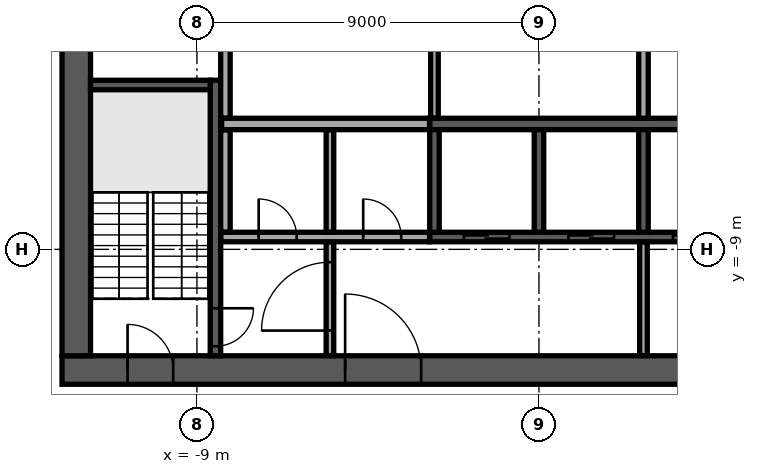
"""IFC4 building model, lengths in metres.
Left out: names, types, materials, properties, quantities, classifications, styles, units other than length and angle.
Written with IfcOpenShell. Run it as: python <this file> out.ifc"""

import sys

from ifc_helpers import new_model, si_unit, direction, frame, frame_2d, origin, place, context, subcontext, project, spatial, rectangle, extrude, element, fill, save


model = new_model("IFC4")
c1 = context("Model", 3, precision=1e-05, world=origin(), true_north=direction((0.0, 1.0)))
c2 = subcontext(c1, "Body", "Model", "MODEL_VIEW")
j1 = project(units=[si_unit("LENGTHUNIT", "METRE"), si_unit("PLANEANGLEUNIT", "RADIAN")], contexts=[c1])
p1 = place(None, origin())
s1 = spatial("IfcSite", under=j1, at=p1, CompositionType="ELEMENT")
p2 = place(p1, origin())
s2 = spatial("IfcBuilding", under=s1, at=p2, CompositionType="ELEMENT")
p3 = place(p2, frame((0.0, 0.0, 274.9)))
s3 = spatial("IfcBuildingStorey", under=s2, at=p3, CompositionType="ELEMENT", Elevation=274.9)
p4 = place(p3, frame((-12.55, -12.175, 0.0), z_axis=(0.0, 0.0, 1.0), x_axis=(1.0, 0.0, 0.0)))
e1 = element("IfcWall", 1, at=p4, inside=s3, PredefinedType="SHEAR", context=c2, shape_type="SweptSolid", body=[
    extrude(rectangle(XDim=25.1, YDim=0.75, at=frame_2d((12.55, 0.0))), origin(), (0.0, 0.0, 1.0), 3.64),
])
p5 = place(p4, frame((7.45, 0.0, 0.0)))
e2 = element("IfcOpeningElement", 2, at=p5, cuts=e1, PredefinedType="OPENING", context=c2, shape_type="SweptSolid", body=[
    extrude(rectangle(XDim=2.0, YDim=2.1, at=frame_2d((1.0, 1.05))), frame((0.0, 0.385, 0.0), z_axis=(0.0, -1.0, 0.0), x_axis=(1.0, 0.0, 0.0)), (0.0, 0.0, 1.0), 0.77),
])
p6 = place(p4, frame((17.575, 0.0, 0.0)))
e3 = element("IfcOpeningElement", 3, at=p6, cuts=e1, PredefinedType="OPENING", context=c2, shape_type="SweptSolid", body=[
    extrude(rectangle(XDim=1.2, YDim=2.1, at=frame_2d((0.6, 1.05))), frame((0.0, 0.385, 0.0), z_axis=(0.0, -1.0, 0.0), x_axis=(1.0, 0.0, 0.0)), (0.0, 0.0, 1.0), 0.77),
])
p7 = place(p4, frame((1.725, 0.0, 0.0)))
e4 = element("IfcOpeningElement", 4, at=p7, cuts=e1, PredefinedType="OPENING", context=c2, shape_type="SweptSolid", body=[
    extrude(rectangle(XDim=1.2, YDim=2.1, at=frame_2d((0.6, 1.05))), frame((0.0, 0.385, 0.0), z_axis=(0.0, -1.0, 0.0), x_axis=(1.0, 0.0, 0.0)), (0.0, 0.0, 1.0), 0.77),
])
p8 = place(p4, frame((22.175, 0.0, 0.0)))
e5 = element("IfcOpeningElement", 5, at=p8, cuts=e1, PredefinedType="OPENING", context=c2, shape_type="SweptSolid", body=[
    extrude(rectangle(XDim=1.2, YDim=2.1, at=frame_2d((0.6, 1.05))), frame((0.0, 0.385, 0.0), z_axis=(0.0, -1.0, 0.0), x_axis=(1.0, 0.0, 0.0)), (0.0, 0.0, 1.0), 0.77),
])
p9 = place(p3, frame((-12.175, -11.8, 0.0), z_axis=(0.0, 0.0, 1.0), x_axis=(0.0, 1.0, 0.0)))
e6 = element("IfcWall", 6, at=p9, inside=s3, PredefinedType="SHEAR", context=c2, shape_type="SweptSolid", body=[
    extrude(rectangle(XDim=23.6, YDim=0.75, at=frame_2d((11.8, 0.0))), origin(), (0.0, 0.0, 1.0), 3.64),
])
p10 = place(p9, frame((10.6, 0.0, 0.0)))
e7 = element("IfcOpeningElement", 7, at=p10, cuts=e6, PredefinedType="OPENING", context=c2, shape_type="SweptSolid", body=[
    extrude(rectangle(XDim=2.4, YDim=2.4, at=frame_2d((1.2, 1.2))), frame((0.0, 0.385, 0.0), z_axis=(0.0, -1.0, 0.0), x_axis=(1.0, 0.0, 0.0)), (0.0, 0.0, 1.0), 0.77),
])
p11 = place(p3, frame((-2.875, -5.7, 0.0), z_axis=(0.0, 0.0, 1.0), x_axis=(1.0, 0.0, 0.0)))
e8 = element("IfcWall", 8, at=p11, inside=s3, PredefinedType="SOLIDWALL", context=c2, shape_type="SweptSolid", body=[
    extrude(rectangle(XDim=11.25, YDim=0.3, at=frame_2d((5.625, 0.0))), origin(), (0.0, 0.0, 1.0), 3.64),
])
p12 = place(p3, frame((2.75, -5.55, 0.0), z_axis=(0.0, 0.0, 1.0), x_axis=(0.0, 1.0, 0.0)))
e9 = element("IfcWall", 9, at=p12, inside=s3, PredefinedType="SOLIDWALL", context=c2, shape_type="SweptSolid", body=[
    extrude(rectangle(XDim=2.7, YDim=0.25, at=frame_2d((1.35, 0.0))), origin(), (0.0, 0.0, 1.0), 3.64),
])
p13 = place(p3, frame((-2.875, -8.675, 0.0), z_axis=(0.0, 0.0, 1.0), x_axis=(1.0, 0.0, 0.0)))
e10 = element("IfcWall", 10, at=p13, inside=s3, PredefinedType="SOLIDWALL", context=c2, shape_type="SweptSolid", body=[
    extrude(rectangle(XDim=11.25, YDim=0.25, at=frame_2d((5.625, 0.0))), origin(), (0.0, 0.0, 1.0), 3.64),
])
p14 = place(p13, frame((0.9, 0.0, 0.0)))
e11 = element("IfcOpeningElement", 11, at=p14, cuts=e10, PredefinedType="OPENING", context=c2, shape_type="SweptSolid", body=[
    extrude(rectangle(XDim=1.2, YDim=2.1, at=frame_2d((0.6, 1.05))), frame((0.0, 0.135, 0.0), z_axis=(0.0, -1.0, 0.0), x_axis=(1.0, 0.0, 0.0)), (0.0, 0.0, 1.0), 0.27),
])
p15 = place(p13, frame((3.65, 0.0, 0.0)))
e12 = element("IfcOpeningElement", 12, at=p15, cuts=e10, PredefinedType="OPENING", context=c2, shape_type="SweptSolid", body=[
    extrude(rectangle(XDim=1.2, YDim=2.1, at=frame_2d((0.6, 1.05))), frame((0.0, 0.135, 0.0), z_axis=(0.0, -1.0, 0.0), x_axis=(1.0, 0.0, 0.0)), (0.0, 0.0, 1.0), 0.27),
])
p16 = place(p13, frame((6.4, 0.0, 0.0)))
e13 = element("IfcOpeningElement", 13, at=p16, cuts=e10, PredefinedType="OPENING", context=c2, shape_type="SweptSolid", body=[
    extrude(rectangle(XDim=1.2, YDim=2.1, at=frame_2d((0.6, 1.05))), frame((0.0, 0.135, 0.0), z_axis=(0.0, -1.0, 0.0), x_axis=(1.0, 0.0, 0.0)), (0.0, 0.0, 1.0), 0.27),
])
p17 = place(p13, frame((9.15, 0.0, 0.0)))
e14 = element("IfcOpeningElement", 14, at=p17, cuts=e10, PredefinedType="OPENING", context=c2, shape_type="SweptSolid", body=[
    extrude(rectangle(XDim=1.2, YDim=2.1, at=frame_2d((0.6, 1.05))), frame((0.0, 0.135, 0.0), z_axis=(0.0, -1.0, 0.0), x_axis=(1.0, 0.0, 0.0)), (0.0, 0.0, 1.0), 0.27),
])
for number, where, z_axis, x_axis in (
    (15, (-2.75, -8.55, 0.0), (0.0, 0.0, 1.0), (0.0, 1.0, 0.0)),
    (16, (0.0, -8.55, 0.0), (0.0, 0.0, 1.0), (0.0, 1.0, 0.0)),
    (17, (2.75, -8.55, 0.0), (0.0, 0.0, 1.0), (0.0, 1.0, 0.0)),
):
    element("IfcWall", number, at=place(p3, frame(where, z_axis=z_axis, x_axis=x_axis)), inside=s3, PredefinedType="SOLIDWALL", context=c2, shape_type="SweptSolid", body=[
        extrude(rectangle(XDim=2.7, YDim=0.25, at=frame_2d((1.35, 0.0))), origin(), (0.0, 0.0, 1.0), 3.64),
    ])
p18 = place(p3, frame((-8.512, -4.55, 0.0), z_axis=(0.0, 0.0, 1.0), x_axis=(0.0, -1.0, 0.0)))
e18 = element("IfcWall", 18, at=p18, inside=s3, PredefinedType="SOLIDWALL", context=c2, shape_type="SweptSolid", body=[
    extrude(rectangle(XDim=7.25, YDim=0.275, at=frame_2d((3.625, 0.0))), origin(), (0.0, 0.0, 1.0), 3.64),
])
p19 = place(p18, frame((6.0, 0.0, 0.0)))
e19 = element("IfcOpeningElement", 19, at=p19, cuts=e18, PredefinedType="OPENING", context=c2, shape_type="SweptSolid", body=[
    extrude(rectangle(XDim=1.0, YDim=2.1, at=frame_2d((0.5, 1.05))), frame((0.0, 0.147, 0.0), z_axis=(0.0, -1.0, 0.0), x_axis=(1.0, 0.0, 0.0)), (0.0, 0.0, 1.0), 0.295),
])
p20 = place(p3, frame((-8.65, -4.675, 0.0), z_axis=(0.0, 0.0, 1.0), x_axis=(-1.0, 0.0, 0.0)))
e20 = element("IfcWall", 20, at=p20, inside=s3, PredefinedType="SOLIDWALL", context=c2, shape_type="SweptSolid", body=[
    extrude(rectangle(XDim=3.15, YDim=0.25, at=frame_2d((1.575, 0.0))), origin(), (0.0, 0.0, 1.0), 3.64),
])
p21 = place(p3, frame((-5.5, -11.795, 0.0), z_axis=(0.0, 0.0, 1.0), x_axis=(0.0, 1.0, 0.0)))
e21 = element("IfcWall", 21, at=p21, inside=s3, PredefinedType="PARTITIONING", context=c2, shape_type="SweptSolid", body=[
    extrude(rectangle(XDim=2.99, YDim=0.2, at=frame_2d((1.495, 0.0))), origin(), (0.0, 0.0, 1.0), 3.64),
])
p22 = place(p21, frame((0.657, 0.0, 0.0)))
e22 = element("IfcOpeningElement", 22, at=p22, cuts=e21, PredefinedType="OPENING", context=c2, shape_type="SweptSolid", body=[
    extrude(rectangle(XDim=1.8, YDim=2.1, at=frame_2d((0.9, 1.05))), frame((0.0, 0.11, 0.0), z_axis=(0.0, -1.0, 0.0), x_axis=(1.0, 0.0, 0.0)), (0.0, 0.0, 1.0), 0.22),
])
p23 = place(p3, frame((2.75, -11.795, 0.0), z_axis=(0.0, 0.0, 1.0), x_axis=(0.0, 1.0, 0.0)))
e23 = element("IfcWall", 23, at=p23, inside=s3, PredefinedType="PARTITIONING", context=c2, shape_type="SweptSolid", body=[
    extrude(rectangle(XDim=2.99, YDim=0.2, at=frame_2d((1.495, 0.0))), origin(), (0.0, 0.0, 1.0), 3.64),
])
p24 = place(p3, frame((-8.37, -8.675, 0.0), z_axis=(0.0, 0.0, 1.0), x_axis=(1.0, 0.0, 0.0)))
e24 = element("IfcWall", 24, at=p24, inside=s3, PredefinedType="PARTITIONING", context=c2, shape_type="SweptSolid", body=[
    extrude(rectangle(XDim=5.49, YDim=0.25, at=frame_2d((2.745, 0.0))), origin(), (0.0, 0.0, 1.0), 3.64),
])
p25 = place(p24, frame((0.995, 0.0, 0.0)))
e25 = element("IfcOpeningElement", 25, at=p25, cuts=e24, PredefinedType="OPENING", context=c2, shape_type="SweptSolid", body=[
    extrude(rectangle(XDim=1.0, YDim=2.1, at=frame_2d((0.5, 1.05))), frame((0.0, 0.135, 0.0), z_axis=(0.0, -1.0, 0.0), x_axis=(1.0, 0.0, 0.0)), (0.0, 0.0, 1.0), 0.27),
])
p26 = place(p24, frame((3.745, 0.0, 0.0)))
e26 = element("IfcOpeningElement", 26, at=p26, cuts=e24, PredefinedType="OPENING", context=c2, shape_type="SweptSolid", body=[
    extrude(rectangle(XDim=1.0, YDim=2.1, at=frame_2d((0.5, 1.05))), frame((0.0, 0.135, 0.0), z_axis=(0.0, -1.0, 0.0), x_axis=(1.0, 0.0, 0.0)), (0.0, 0.0, 1.0), 0.27),
])
p27 = place(p3, frame((-8.25, -8.545, 0.0), z_axis=(0.0, 0.0, 1.0), x_axis=(0.0, 1.0, 0.0)))
e27 = element("IfcWall", 27, at=p27, inside=s3, PredefinedType="PARTITIONING", context=c2, shape_type="SweptSolid", body=[
    extrude(rectangle(XDim=2.69, YDim=0.25, at=frame_2d((1.345, 0.0))), origin(), (0.0, 0.0, 1.0), 3.64),
])
p28 = place(p3, frame((-5.5, -8.545, 0.0), z_axis=(0.0, 0.0, 1.0), x_axis=(0.0, 1.0, 0.0)))
e28 = element("IfcWall", 28, at=p28, inside=s3, PredefinedType="PARTITIONING", context=c2, shape_type="SweptSolid", body=[
    extrude(rectangle(XDim=2.69, YDim=0.2, at=frame_2d((1.345, 0.0))), origin(), (0.0, 0.0, 1.0), 3.64),
])
p29 = place(p3, frame((-8.35, -5.7, 0.0), z_axis=(0.0, 0.0, 1.0), x_axis=(1.0, 0.0, 0.0)))
e29 = element("IfcWall", 29, at=p29, inside=s3, PredefinedType="PARTITIONING", context=c2, shape_type="SweptSolid", body=[
    extrude(rectangle(XDim=5.47, YDim=0.3, at=frame_2d((2.735, 0.0))), origin(), (0.0, 0.0, 1.0), 3.64),
])
p30 = place(p3, frame((-8.25, -5.545, 0.0), z_axis=(0.0, 0.0, 1.0), x_axis=(0.0, 1.0, 0.0)))
e30 = element("IfcWall", 30, at=p30, inside=s3, PredefinedType="PARTITIONING", context=c2, shape_type="SweptSolid", body=[
    extrude(rectangle(XDim=2.69, YDim=0.25, at=frame_2d((1.345, 0.0))), origin(), (0.0, 0.0, 1.0), 3.64),
])
p31 = place(p3, frame((-2.75, -5.545, 0.0), z_axis=(0.0, 0.0, 1.0), x_axis=(0.0, 1.0, 0.0)))
e31 = element("IfcWall", 31, at=p31, inside=s3, PredefinedType="PARTITIONING", context=c2, shape_type="SweptSolid", body=[
    extrude(rectangle(XDim=2.69, YDim=0.2, at=frame_2d((1.345, 0.0))), origin(), (0.0, 0.0, 1.0), 3.64),
])
p32 = place(p3, frame((-9.159, 32.618, 0.0), z_axis=(0.0, 0.0, 1.0), x_axis=(-0.469470468388, -0.88294817476, 0.0)))
e32 = element("IfcWall", 32, at=p32, inside=s3, PredefinedType="STANDARD", context=c2, shape_type="SweptSolid", body=[
    extrude(rectangle(XDim=48.843, YDim=0.6, at=frame_2d((24.422, 0.0))), origin(), (0.0, 0.0, 1.0), 3.64),
])
p33 = place(p32, frame((1.22, 0.0, 0.9)))
e33 = element("IfcOpeningElement", 33, at=p33, cuts=e32, PredefinedType="OPENING", context=c2, shape_type="SweptSolid", body=[
    extrude(rectangle(XDim=2.0, YDim=2.1, at=frame_2d((1.0, 1.05))), frame((0.0, 0.31, 0.0), z_axis=(0.0, -1.0, 0.0), x_axis=(1.0, 0.0, 0.0)), (0.0, 0.0, 1.0), 0.62),
])
p34 = place(p32, frame((5.66, 0.0, 0.9)))
e34 = element("IfcOpeningElement", 34, at=p34, cuts=e32, PredefinedType="OPENING", context=c2, shape_type="SweptSolid", body=[
    extrude(rectangle(XDim=2.0, YDim=2.1, at=frame_2d((1.0, 1.05))), frame((0.0, 0.31, 0.0), z_axis=(0.0, -1.0, 0.0), x_axis=(1.0, 0.0, 0.0)), (0.0, 0.0, 1.0), 0.62),
])
p35 = place(p32, frame((10.101, 0.0, 0.9)))
e35 = element("IfcOpeningElement", 35, at=p35, cuts=e32, PredefinedType="OPENING", context=c2, shape_type="SweptSolid", body=[
    extrude(rectangle(XDim=2.0, YDim=2.1, at=frame_2d((1.0, 1.05))), frame((0.0, 0.31, 0.0), z_axis=(0.0, -1.0, 0.0), x_axis=(1.0, 0.0, 0.0)), (0.0, 0.0, 1.0), 0.62),
])
p36 = place(p32, frame((14.541, 0.0, 0.9)))
e36 = element("IfcOpeningElement", 36, at=p36, cuts=e32, PredefinedType="OPENING", context=c2, shape_type="SweptSolid", body=[
    extrude(rectangle(XDim=2.0, YDim=2.1, at=frame_2d((1.0, 1.05))), frame((0.0, 0.31, 0.0), z_axis=(0.0, -1.0, 0.0), x_axis=(1.0, 0.0, 0.0)), (0.0, 0.0, 1.0), 0.62),
])
p37 = place(p32, frame((18.981, 0.0, 0.9)))
e37 = element("IfcOpeningElement", 37, at=p37, cuts=e32, PredefinedType="OPENING", context=c2, shape_type="SweptSolid", body=[
    extrude(rectangle(XDim=2.0, YDim=2.1, at=frame_2d((1.0, 1.05))), frame((0.0, 0.31, 0.0), z_axis=(0.0, -1.0, 0.0), x_axis=(1.0, 0.0, 0.0)), (0.0, 0.0, 1.0), 0.62),
])
p38 = place(p32, frame((23.422, 0.0, 0.9)))
e38 = element("IfcOpeningElement", 38, at=p38, cuts=e32, PredefinedType="OPENING", context=c2, shape_type="SweptSolid", body=[
    extrude(rectangle(XDim=2.0, YDim=2.1, at=frame_2d((1.0, 1.05))), frame((0.0, 0.31, 0.0), z_axis=(0.0, -1.0, 0.0), x_axis=(1.0, 0.0, 0.0)), (0.0, 0.0, 1.0), 0.62),
])
p39 = place(p32, frame((27.862, 0.0, 0.9)))
e39 = element("IfcOpeningElement", 39, at=p39, cuts=e32, PredefinedType="OPENING", context=c2, shape_type="SweptSolid", body=[
    extrude(rectangle(XDim=2.0, YDim=2.1, at=frame_2d((1.0, 1.05))), frame((0.0, 0.31, 0.0), z_axis=(0.0, -1.0, 0.0), x_axis=(1.0, 0.0, 0.0)), (0.0, 0.0, 1.0), 0.62),
])
p40 = place(p32, frame((32.302, 0.0, 0.9)))
e40 = element("IfcOpeningElement", 40, at=p40, cuts=e32, PredefinedType="OPENING", context=c2, shape_type="SweptSolid", body=[
    extrude(rectangle(XDim=2.0, YDim=2.1, at=frame_2d((1.0, 1.05))), frame((0.0, 0.31, 0.0), z_axis=(0.0, -1.0, 0.0), x_axis=(1.0, 0.0, 0.0)), (0.0, 0.0, 1.0), 0.62),
])
p41 = place(p32, frame((36.742, 0.0, 0.9)))
e41 = element("IfcOpeningElement", 41, at=p41, cuts=e32, PredefinedType="OPENING", context=c2, shape_type="SweptSolid", body=[
    extrude(rectangle(XDim=2.0, YDim=2.1, at=frame_2d((1.0, 1.05))), frame((0.0, 0.31, 0.0), z_axis=(0.0, -1.0, 0.0), x_axis=(1.0, 0.0, 0.0)), (0.0, 0.0, 1.0), 0.62),
])
p42 = place(p32, frame((41.183, 0.0, 0.9)))
e42 = element("IfcOpeningElement", 42, at=p42, cuts=e32, PredefinedType="OPENING", context=c2, shape_type="SweptSolid", body=[
    extrude(rectangle(XDim=2.0, YDim=2.1, at=frame_2d((1.0, 1.05))), frame((0.0, 0.31, 0.0), z_axis=(0.0, -1.0, 0.0), x_axis=(1.0, 0.0, 0.0)), (0.0, 0.0, 1.0), 0.62),
])
p43 = place(p32, frame((45.623, 0.0, 0.9)))
e43 = element("IfcOpeningElement", 43, at=p43, cuts=e32, PredefinedType="OPENING", context=c2, shape_type="SweptSolid", body=[
    extrude(rectangle(XDim=2.0, YDim=2.1, at=frame_2d((1.0, 1.05))), frame((0.0, 0.31, 0.0), z_axis=(0.0, -1.0, 0.0), x_axis=(1.0, 0.0, 0.0)), (0.0, 0.0, 1.0), 0.62),
])
p44 = place(p3, frame((-26.271, -7.606, 0.0), z_axis=(0.0, 0.0, 1.0), x_axis=(0.882946860375, -0.469472940385, 0.0)))
e44 = element("IfcWall", 44, at=p44, inside=s3, PredefinedType="PARTITIONING", context=c2, shape_type="SweptSolid", body=[
    extrude(rectangle(XDim=39.325, YDim=0.15, at=frame_2d((19.662, 0.0))), origin(), (0.0, 0.0, 1.0), 3.04),
])
p45 = place(p44, frame((2.8, 0.0, 0.0)))
e45 = element("IfcOpeningElement", 45, at=p45, cuts=e44, PredefinedType="OPENING", context=c2, shape_type="SweptSolid", body=[
    extrude(rectangle(XDim=1.0, YDim=2.1, at=frame_2d((0.5, 1.05))), frame((0.0, 0.085, 0.0), z_axis=(0.0, -1.0, 0.0), x_axis=(1.0, 0.0, 0.0)), (0.0, 0.0, 1.0), 0.17),
])
p46 = place(p44, frame((6.915, 0.0, 0.0)))
e46 = element("IfcOpeningElement", 46, at=p46, cuts=e44, PredefinedType="OPENING", context=c2, shape_type="SweptSolid", body=[
    extrude(rectangle(XDim=1.0, YDim=2.1, at=frame_2d((0.5, 1.05))), frame((0.0, 0.085, 0.0), z_axis=(0.0, -1.0, 0.0), x_axis=(1.0, 0.0, 0.0)), (0.0, 0.0, 1.0), 0.17),
])
p47 = place(p44, frame((14.499, 0.0, 0.0)))
e47 = element("IfcOpeningElement", 47, at=p47, cuts=e44, PredefinedType="OPENING", context=c2, shape_type="SweptSolid", body=[
    extrude(rectangle(XDim=1.0, YDim=2.1, at=frame_2d((0.5, 1.05))), frame((0.0, 0.085, 0.0), z_axis=(0.0, -1.0, 0.0), x_axis=(1.0, 0.0, 0.0)), (0.0, 0.0, 1.0), 0.17),
])
p48 = place(p44, frame((25.785, 0.0, 0.0)))
e48 = element("IfcOpeningElement", 48, at=p48, cuts=e44, PredefinedType="OPENING", context=c2, shape_type="SweptSolid", body=[
    extrude(rectangle(XDim=1.0, YDim=2.1, at=frame_2d((0.5, 1.05))), frame((0.0, 0.085, 0.0), z_axis=(0.0, -1.0, 0.0), x_axis=(1.0, 0.0, 0.0)), (0.0, 0.0, 1.0), 0.17),
])
p49 = place(p44, frame((37.741, 0.0, 0.0)))
e49 = element("IfcOpeningElement", 49, at=p49, cuts=e44, PredefinedType="OPENING", context=c2, shape_type="SweptSolid", body=[
    extrude(rectangle(XDim=1.0, YDim=2.1, at=frame_2d((0.5, 1.05))), frame((0.0, 0.085, 0.0), z_axis=(0.0, -1.0, 0.0), x_axis=(1.0, 0.0, 0.0)), (0.0, 0.0, 1.0), 0.17),
])
p50 = place(p5, origin())
e50 = element("IfcDoor", 50, at=p50, inside=s3, OperationType="SINGLE_SWING_LEFT", PredefinedType="DOOR", context=c2, shape_type="SweptSolid", body=[
    extrude(rectangle(XDim=2.0, YDim=2.1, at=frame_2d((1.0, 1.05))), frame((0.0, 0.025, 0.0), z_axis=(0.0, -1.0, 0.0), x_axis=(1.0, 0.0, 0.0)), (0.0, 0.0, 1.0), 0.05),
])
fill(e2, e50)
p51 = place(p7, origin())
e51 = element("IfcDoor", 51, at=p51, inside=s3, OperationType="SINGLE_SWING_LEFT", PredefinedType="DOOR", context=c2, shape_type="SweptSolid", body=[
    extrude(rectangle(XDim=1.2, YDim=2.1, at=frame_2d((0.6, 1.05))), frame((0.0, 0.025, 0.0), z_axis=(0.0, -1.0, 0.0), x_axis=(1.0, 0.0, 0.0)), (0.0, 0.0, 1.0), 0.05),
])
fill(e4, e51)
p52 = place(p14, origin())
e52 = element("IfcDoor", 52, at=p52, inside=s3, OperationType="DOUBLE_DOOR_SLIDING", PredefinedType="DOOR", context=c2, shape_type="SweptSolid", body=[
    extrude(rectangle(XDim=1.2, YDim=2.1, at=frame_2d((0.6, 1.05))), frame((0.0, 0.025, 0.0), z_axis=(0.0, -1.0, 0.0), x_axis=(1.0, 0.0, 0.0)), (0.0, 0.0, 1.0), 0.05),
])
fill(e11, e52)
p53 = place(p15, origin())
e53 = element("IfcDoor", 53, at=p53, inside=s3, OperationType="DOUBLE_DOOR_SLIDING", PredefinedType="DOOR", context=c2, shape_type="SweptSolid", body=[
    extrude(rectangle(XDim=1.2, YDim=2.1, at=frame_2d((0.6, 1.05))), frame((0.0, 0.025, 0.0), z_axis=(0.0, -1.0, 0.0), x_axis=(1.0, 0.0, 0.0)), (0.0, 0.0, 1.0), 0.05),
])
fill(e12, e53)
p54 = place(p16, origin())
e54 = element("IfcDoor", 54, at=p54, inside=s3, OperationType="DOUBLE_DOOR_SLIDING", PredefinedType="DOOR", context=c2, shape_type="SweptSolid", body=[
    extrude(rectangle(XDim=1.2, YDim=2.1, at=frame_2d((0.6, 1.05))), frame((0.0, 0.025, 0.0), z_axis=(0.0, -1.0, 0.0), x_axis=(1.0, 0.0, 0.0)), (0.0, 0.0, 1.0), 0.05),
])
fill(e13, e54)
p55 = place(p19, origin())
e55 = element("IfcDoor", 55, at=p55, inside=s3, OperationType="SINGLE_SWING_LEFT", PredefinedType="DOOR", context=c2, shape_type="SweptSolid", body=[
    extrude(rectangle(XDim=1.0, YDim=2.1, at=frame_2d((0.5, 1.05))), frame((0.0, 0.025, 0.0), z_axis=(0.0, -1.0, 0.0), x_axis=(1.0, 0.0, 0.0)), (0.0, 0.0, 1.0), 0.05),
])
fill(e19, e55)
p56 = place(p25, origin())
e56 = element("IfcDoor", 56, at=p56, inside=s3, OperationType="SINGLE_SWING_RIGHT", PredefinedType="DOOR", context=c2, shape_type="SweptSolid", body=[
    extrude(rectangle(XDim=1.0, YDim=2.1, at=frame_2d((0.5, 1.05))), frame((0.0, 0.025, 0.0), z_axis=(0.0, -1.0, 0.0), x_axis=(1.0, 0.0, 0.0)), (0.0, 0.0, 1.0), 0.05),
])
fill(e25, e56)
p57 = place(p26, origin())
e57 = element("IfcDoor", 57, at=p57, inside=s3, OperationType="SINGLE_SWING_RIGHT", PredefinedType="DOOR", context=c2, shape_type="SweptSolid", body=[
    extrude(rectangle(XDim=1.0, YDim=2.1, at=frame_2d((0.5, 1.05))), frame((0.0, 0.025, 0.0), z_axis=(0.0, -1.0, 0.0), x_axis=(1.0, 0.0, 0.0)), (0.0, 0.0, 1.0), 0.05),
])
fill(e26, e57)
p58 = place(p22, origin())
e58 = element("IfcDoor", 58, at=p58, inside=s3, OperationType="SINGLE_SWING_LEFT", PredefinedType="DOOR", context=c2, shape_type="SweptSolid", body=[
    extrude(rectangle(XDim=1.8, YDim=2.1, at=frame_2d((0.9, 1.05))), frame((0.0, 0.025, 0.0), z_axis=(0.0, -1.0, 0.0), x_axis=(1.0, 0.0, 0.0)), (0.0, 0.0, 1.0), 0.05),
])
fill(e22, e58)
save(model, sys.argv[1])
